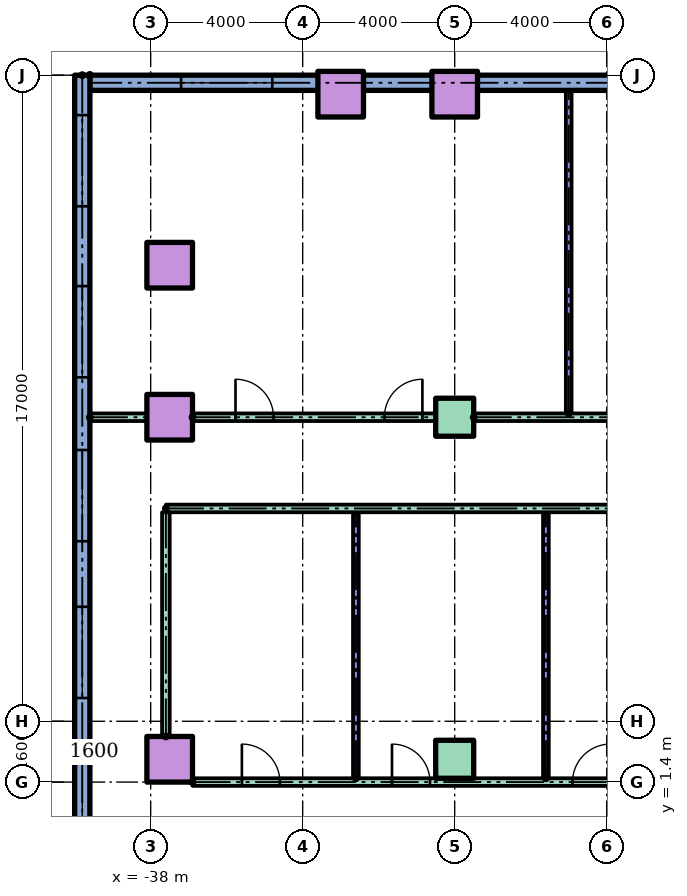
"""IFC4 building model, lengths in metres.
Left out: names, types, materials, properties, quantities, classifications, styles, units other than length and angle.
Written with IfcOpenShell. Run it as: python <this file> out.ifc"""

import sys

from ifc_helpers import new_model, si_unit, direction, frame, frame_2d, origin, origin_2d, place, context, subcontext, project, spatial, rectangle, hollow_rectangle, extrude, element, fill, save


model = new_model("IFC4")
c1 = context("Model", 3, precision=1e-05, world=origin(), true_north=direction((0.0, 1.0)))
c2 = subcontext(c1, "Body", "Model", "MODEL_VIEW")
j1 = project(units=[si_unit("LENGTHUNIT", "METRE"), si_unit("PLANEANGLEUNIT", "RADIAN")], contexts=[c1])
p1 = place(None, origin())
s1 = spatial("IfcSite", under=j1, at=p1, CompositionType="ELEMENT")
p2 = place(p1, origin())
s2 = spatial("IfcBuilding", under=s1, at=p2, CompositionType="ELEMENT")
p3 = place(p2, frame((0.0, 0.0, 10.0)))
s3 = spatial("IfcBuildingStorey", under=s2, at=p3, CompositionType="ELEMENT", Elevation=10.0)
p4 = place(p3, frame((-37.5, 2.0, 0.0)))
e1 = element("IfcColumn", 1, at=p4, inside=s3, PredefinedType="COLUMN", context=c2, shape_type="SweptSolid", body=[
    extrude(hollow_rectangle(XDim=1.2, YDim=1.2, WallThickness=0.06, at=origin_2d()), origin(), (0.0, 0.0, 1.0), 4.0),
])
p5 = place(p3, frame((-30.0, 2.0, 0.0)))
e2 = element("IfcColumn", 2, at=p5, inside=s3, PredefinedType="COLUMN", context=c2, shape_type="SweptSolid", body=[
    extrude(rectangle(XDim=1.0, YDim=1.0, at=origin_2d()), origin(), (0.0, 0.0, 1.0), 4.0),
])
p6 = place(p3, frame((-37.5, 11.0, 0.0)))
e3 = element("IfcColumn", 3, at=p6, inside=s3, PredefinedType="COLUMN", context=c2, shape_type="SweptSolid", body=[
    extrude(hollow_rectangle(XDim=1.2, YDim=1.2, WallThickness=0.06, at=origin_2d()), origin(), (0.0, 0.0, 1.0), 4.0),
])
p7 = place(p3, frame((-30.0, 11.0, 0.0)))
e4 = element("IfcColumn", 4, at=p7, inside=s3, PredefinedType="COLUMN", context=c2, shape_type="SweptSolid", body=[
    extrude(rectangle(XDim=1.0, YDim=1.0, at=origin_2d()), origin(), (0.0, 0.0, 1.0), 4.0),
])
for number, where in (
    (5, (-37.5, 15.0, 0.0)),
    (6, (-33.0, 19.5, 0.0)),
    (7, (-30.0, 19.5, 0.0)),
):
    element("IfcColumn", number, at=place(p3, frame(where)), inside=s3, PredefinedType="COLUMN", context=c2, shape_type="SweptSolid", body=[
        extrude(hollow_rectangle(XDim=1.2, YDim=1.2, WallThickness=0.06, at=origin_2d()), origin(), (0.0, 0.0, 1.0), 4.0),
    ])
p8 = place(p3, frame((-14.0, 19.8, 0.0), z_axis=(0.0, 0.0, 1.0), x_axis=(-1.0, 0.0, 0.0)))
e8 = element("IfcWall", 8, at=p8, inside=s3, PredefinedType="STANDARD", context=c2, shape_type="SweptSolid", body=[
    extrude(rectangle(XDim=25.6, YDim=0.4, at=frame_2d((12.8, 0.0))), origin(), (0.0, 0.0, 1.0), 3.7),
])
p9 = place(p8, frame((0.8, 0.0, 0.9)))
e9 = element("IfcOpeningElement", 9, at=p9, cuts=e8, PredefinedType="OPENING", context=c2, shape_type="SweptSolid", body=[
    extrude(rectangle(XDim=2.4, YDim=2.1, at=frame_2d((1.2, 1.05))), frame((0.0, 0.21, 0.0), z_axis=(0.0, -1.0, 0.0), x_axis=(1.0, 0.0, 0.0)), (0.0, 0.0, 1.0), 0.42),
])
p10 = place(p8, frame((4.535, 0.0, 0.9)))
e10 = element("IfcOpeningElement", 10, at=p10, cuts=e8, PredefinedType="OPENING", context=c2, shape_type="SweptSolid", body=[
    extrude(rectangle(XDim=2.4, YDim=2.1, at=frame_2d((1.2, 1.05))), frame((0.0, 0.21, 0.0), z_axis=(0.0, -1.0, 0.0), x_axis=(1.0, 0.0, 0.0)), (0.0, 0.0, 1.0), 0.42),
])
p11 = place(p8, frame((9.065, 0.0, 0.9)))
e11 = element("IfcOpeningElement", 11, at=p11, cuts=e8, PredefinedType="OPENING", context=c2, shape_type="SweptSolid", body=[
    extrude(rectangle(XDim=2.4, YDim=2.1, at=frame_2d((1.2, 1.05))), frame((0.0, 0.21, 0.0), z_axis=(0.0, -1.0, 0.0), x_axis=(1.0, 0.0, 0.0)), (0.0, 0.0, 1.0), 0.42),
])
p12 = place(p8, frame((20.8, 0.0, 0.9)))
e12 = element("IfcOpeningElement", 12, at=p12, cuts=e8, PredefinedType="OPENING", context=c2, shape_type="SweptSolid", body=[
    extrude(rectangle(XDim=2.4, YDim=2.1, at=frame_2d((1.2, 1.05))), frame((0.0, 0.21, 0.0), z_axis=(0.0, -1.0, 0.0), x_axis=(1.0, 0.0, 0.0)), (0.0, 0.0, 1.0), 0.42),
])
p13 = place(p3, frame((-39.8, 20.0, 0.0), z_axis=(0.0, 0.0, 1.0), x_axis=(0.0, -1.0, 0.0)))
e13 = element("IfcWall", 13, at=p13, inside=s3, PredefinedType="STANDARD", context=c2, shape_type="SweptSolid", body=[
    extrude(rectangle(XDim=70.0, YDim=0.4, at=frame_2d((35.0, 0.0))), origin(), (0.0, 0.0, 1.0), 3.7),
])
p14 = place(p13, frame((1.05, 0.0, 0.9)))
e14 = element("IfcOpeningElement", 14, at=p14, cuts=e13, PredefinedType="OPENING", context=c2, shape_type="SweptSolid", body=[
    extrude(rectangle(XDim=2.4, YDim=2.1, at=frame_2d((1.2, 1.05))), frame((0.0, 0.21, 0.0), z_axis=(0.0, -1.0, 0.0), x_axis=(1.0, 0.0, 0.0)), (0.0, 0.0, 1.0), 0.42),
])
p15 = place(p13, frame((5.55, 0.0, 0.9)))
e15 = element("IfcOpeningElement", 15, at=p15, cuts=e13, PredefinedType="OPENING", context=c2, shape_type="SweptSolid", body=[
    extrude(rectangle(XDim=2.4, YDim=2.1, at=frame_2d((1.2, 1.05))), frame((0.0, 0.21, 0.0), z_axis=(0.0, -1.0, 0.0), x_axis=(1.0, 0.0, 0.0)), (0.0, 0.0, 1.0), 0.42),
])
p16 = place(p13, frame((9.863, 0.0, 0.9)))
e16 = element("IfcOpeningElement", 16, at=p16, cuts=e13, PredefinedType="OPENING", context=c2, shape_type="SweptSolid", body=[
    extrude(rectangle(XDim=2.4, YDim=2.1, at=frame_2d((1.2, 1.05))), frame((0.0, 0.21, 0.0), z_axis=(0.0, -1.0, 0.0), x_axis=(1.0, 0.0, 0.0)), (0.0, 0.0, 1.0), 0.42),
])
p17 = place(p13, frame((13.988, 0.0, 0.9)))
e17 = element("IfcOpeningElement", 17, at=p17, cuts=e13, PredefinedType="OPENING", context=c2, shape_type="SweptSolid", body=[
    extrude(rectangle(XDim=2.4, YDim=2.1, at=frame_2d((1.2, 1.05))), frame((0.0, 0.21, 0.0), z_axis=(0.0, -1.0, 0.0), x_axis=(1.0, 0.0, 0.0)), (0.0, 0.0, 1.0), 0.42),
])
p18 = place(p13, frame((18.113, 0.0, 0.9)))
e18 = element("IfcOpeningElement", 18, at=p18, cuts=e13, PredefinedType="OPENING", context=c2, shape_type="SweptSolid", body=[
    extrude(rectangle(XDim=2.4, YDim=2.1, at=frame_2d((1.2, 1.05))), frame((0.0, 0.21, 0.0), z_axis=(0.0, -1.0, 0.0), x_axis=(1.0, 0.0, 0.0)), (0.0, 0.0, 1.0), 0.42),
])
p19 = place(p13, frame((22.238, 0.0, 0.9)))
e19 = element("IfcOpeningElement", 19, at=p19, cuts=e13, PredefinedType="OPENING", context=c2, shape_type="SweptSolid", body=[
    extrude(rectangle(XDim=2.4, YDim=2.1, at=frame_2d((1.2, 1.05))), frame((0.0, 0.21, 0.0), z_axis=(0.0, -1.0, 0.0), x_axis=(1.0, 0.0, 0.0)), (0.0, 0.0, 1.0), 0.42),
])
p20 = place(p13, frame((26.363, 0.0, 0.9)))
e20 = element("IfcOpeningElement", 20, at=p20, cuts=e13, PredefinedType="OPENING", context=c2, shape_type="SweptSolid", body=[
    extrude(rectangle(XDim=2.4, YDim=2.1, at=frame_2d((1.2, 1.05))), frame((0.0, 0.21, 0.0), z_axis=(0.0, -1.0, 0.0), x_axis=(1.0, 0.0, 0.0)), (0.0, 0.0, 1.0), 0.42),
])
p21 = place(p13, frame((30.488, 0.0, 0.9)))
e21 = element("IfcOpeningElement", 21, at=p21, cuts=e13, PredefinedType="OPENING", context=c2, shape_type="SweptSolid", body=[
    extrude(rectangle(XDim=2.4, YDim=2.1, at=frame_2d((1.2, 1.05))), frame((0.0, 0.21, 0.0), z_axis=(0.0, -1.0, 0.0), x_axis=(1.0, 0.0, 0.0)), (0.0, 0.0, 1.0), 0.42),
])
p22 = place(p13, frame((34.613, 0.0, 0.9)))
e22 = element("IfcOpeningElement", 22, at=p22, cuts=e13, PredefinedType="OPENING", context=c2, shape_type="SweptSolid", body=[
    extrude(rectangle(XDim=2.4, YDim=2.1, at=frame_2d((1.2, 1.05))), frame((0.0, 0.21, 0.0), z_axis=(0.0, -1.0, 0.0), x_axis=(1.0, 0.0, 0.0)), (0.0, 0.0, 1.0), 0.42),
])
p23 = place(p13, frame((38.738, 0.0, 0.9)))
e23 = element("IfcOpeningElement", 23, at=p23, cuts=e13, PredefinedType="OPENING", context=c2, shape_type="SweptSolid", body=[
    extrude(rectangle(XDim=2.4, YDim=2.1, at=frame_2d((1.2, 1.05))), frame((0.0, 0.21, 0.0), z_axis=(0.0, -1.0, 0.0), x_axis=(1.0, 0.0, 0.0)), (0.0, 0.0, 1.0), 0.42),
])
p24 = place(p13, frame((42.633, 0.0, 0.9)))
e24 = element("IfcOpeningElement", 24, at=p24, cuts=e13, PredefinedType="OPENING", context=c2, shape_type="SweptSolid", body=[
    extrude(rectangle(XDim=2.4, YDim=2.1, at=frame_2d((1.2, 1.05))), frame((0.0, 0.21, 0.0), z_axis=(0.0, -1.0, 0.0), x_axis=(1.0, 0.0, 0.0)), (0.0, 0.0, 1.0), 0.42),
])
p25 = place(p13, frame((46.3, 0.0, 0.9)))
e25 = element("IfcOpeningElement", 25, at=p25, cuts=e13, PredefinedType="OPENING", context=c2, shape_type="SweptSolid", body=[
    extrude(rectangle(XDim=2.4, YDim=2.1, at=frame_2d((1.2, 1.05))), frame((0.0, 0.21, 0.0), z_axis=(0.0, -1.0, 0.0), x_axis=(1.0, 0.0, 0.0)), (0.0, 0.0, 1.0), 0.42),
])
p26 = place(p13, frame((49.967, 0.0, 0.9)))
e26 = element("IfcOpeningElement", 26, at=p26, cuts=e13, PredefinedType="OPENING", context=c2, shape_type="SweptSolid", body=[
    extrude(rectangle(XDim=2.4, YDim=2.1, at=frame_2d((1.2, 1.05))), frame((0.0, 0.21, 0.0), z_axis=(0.0, -1.0, 0.0), x_axis=(1.0, 0.0, 0.0)), (0.0, 0.0, 1.0), 0.42),
])
p27 = place(p13, frame((66.85, 0.0, 0.9)))
e27 = element("IfcOpeningElement", 27, at=p27, cuts=e13, PredefinedType="OPENING", context=c2, shape_type="SweptSolid", body=[
    extrude(rectangle(XDim=2.4, YDim=2.1, at=frame_2d((1.2, 1.05))), frame((0.0, 0.21, 0.0), z_axis=(0.0, -1.0, 0.0), x_axis=(1.0, 0.0, 0.0)), (0.0, 0.0, 1.0), 0.42),
])
p28 = place(p3, frame((-36.9, 1.4, 0.0)))
e28 = element("IfcWall", 28, at=p28, inside=s3, PredefinedType="PARTITIONING", context=c2, shape_type="SweptSolid", body=[
    extrude(rectangle(XDim=20.6, YDim=0.2, at=frame_2d((10.3, 0.0))), origin(), (0.0, 0.0, 1.0), 3.7),
])
p29 = place(p28, frame((1.3, 0.0, 0.0)))
e29 = element("IfcOpeningElement", 29, at=p29, cuts=e28, PredefinedType="OPENING", context=c2, shape_type="SweptSolid", body=[
    extrude(rectangle(XDim=1.0, YDim=2.1, at=frame_2d((0.5, 1.05))), frame((0.0, 0.11, 0.0), z_axis=(0.0, -1.0, 0.0), x_axis=(1.0, 0.0, 0.0)), (0.0, 0.0, 1.0), 0.22),
])
p30 = place(p28, frame((5.25, 0.0, 0.0)))
e30 = element("IfcOpeningElement", 30, at=p30, cuts=e28, PredefinedType="OPENING", context=c2, shape_type="SweptSolid", body=[
    extrude(rectangle(XDim=1.0, YDim=2.1, at=frame_2d((0.5, 1.05))), frame((0.0, 0.11, 0.0), z_axis=(0.0, -1.0, 0.0), x_axis=(1.0, 0.0, 0.0)), (0.0, 0.0, 1.0), 0.22),
])
p31 = place(p28, frame((10.0, 0.0, 0.0)))
e31 = element("IfcOpeningElement", 31, at=p31, cuts=e28, PredefinedType="OPENING", context=c2, shape_type="SweptSolid", body=[
    extrude(rectangle(XDim=1.0, YDim=2.1, at=frame_2d((0.5, 1.05))), frame((0.0, 0.11, 0.0), z_axis=(0.0, -1.0, 0.0), x_axis=(1.0, 0.0, 0.0)), (0.0, 0.0, 1.0), 0.22),
])
p32 = place(p28, frame((12.35, 0.0, 0.0)))
e32 = element("IfcOpeningElement", 32, at=p32, cuts=e28, PredefinedType="OPENING", context=c2, shape_type="SweptSolid", body=[
    extrude(rectangle(XDim=0.9, YDim=2.1, at=frame_2d((0.45, 1.05))), frame((0.0, 0.11, 0.0), z_axis=(0.0, -1.0, 0.0), x_axis=(1.0, 0.0, 0.0)), (0.0, 0.0, 1.0), 0.22),
])
p33 = place(p3, frame((-37.6, 8.6, 0.0)))
e33 = element("IfcWall", 33, at=p33, inside=s3, PredefinedType="PARTITIONING", context=c2, shape_type="SweptSolid", body=[
    extrude(rectangle(XDim=21.3, YDim=0.2, at=frame_2d((10.65, 0.0))), origin(), (0.0, 0.0, 1.0), 3.7),
])
p34 = place(p3, frame((-39.6, 11.0, 0.0)))
e34 = element("IfcWall", 34, at=p34, inside=s3, PredefinedType="PARTITIONING", context=c2, shape_type="SweptSolid", body=[
    extrude(rectangle(XDim=1.5, YDim=0.2, at=frame_2d((0.75, 0.0))), origin(), (0.0, 0.0, 1.0), 3.7),
])
p35 = place(p3, frame((-36.9, 11.0, 0.0)))
e35 = element("IfcWall", 35, at=p35, inside=s3, PredefinedType="PARTITIONING", context=c2, shape_type="SweptSolid", body=[
    extrude(rectangle(XDim=6.4, YDim=0.2, at=frame_2d((3.2, 0.0))), origin(), (0.0, 0.0, 1.0), 3.7),
])
p36 = place(p35, frame((1.132, 0.0, 0.0)))
e36 = element("IfcOpeningElement", 36, at=p36, cuts=e35, PredefinedType="OPENING", context=c2, shape_type="SweptSolid", body=[
    extrude(rectangle(XDim=1.0, YDim=2.1, at=frame_2d((0.5, 1.05))), frame((0.0, 0.11, 0.0), z_axis=(0.0, -1.0, 0.0), x_axis=(1.0, 0.0, 0.0)), (0.0, 0.0, 1.0), 0.22),
])
p37 = place(p35, frame((5.05, 0.0, 0.0)))
e37 = element("IfcOpeningElement", 37, at=p37, cuts=e35, PredefinedType="OPENING", context=c2, shape_type="SweptSolid", body=[
    extrude(rectangle(XDim=1.0, YDim=2.1, at=frame_2d((0.5, 1.05))), frame((0.0, 0.11, 0.0), z_axis=(0.0, -1.0, 0.0), x_axis=(1.0, 0.0, 0.0)), (0.0, 0.0, 1.0), 0.22),
])
p38 = place(p3, frame((-29.5, 11.0, 0.0)))
e38 = element("IfcWall", 38, at=p38, inside=s3, PredefinedType="PARTITIONING", context=c2, shape_type="SweptSolid", body=[
    extrude(rectangle(XDim=7.0, YDim=0.2, at=frame_2d((3.5, 0.0))), origin(), (0.0, 0.0, 1.0), 3.7),
])
p39 = place(p3, frame((-37.6, 2.6, 0.0), z_axis=(0.0, 0.0, 1.0), x_axis=(0.0, 1.0, 0.0)))
e39 = element("IfcWall", 39, at=p39, inside=s3, PredefinedType="PARTITIONING", context=c2, shape_type="SweptSolid", body=[
    extrude(rectangle(XDim=5.9, YDim=0.2, at=frame_2d((2.95, 0.0))), origin(), (0.0, 0.0, 1.0), 3.7),
])
for number, where, z_axis, x_axis in (
    (40, (-32.6, 1.5, 0.0), (0.0, 0.0, 1.0), (0.0, 1.0, 0.0)),
    (41, (-27.6, 1.5, 0.0), (0.0, 0.0, 1.0), (0.0, 1.0, 0.0)),
):
    element("IfcWall", number, at=place(p3, frame(where, z_axis=z_axis, x_axis=x_axis)), inside=s3, PredefinedType="PARTITIONING", context=c2, shape_type="SweptSolid", body=[
        extrude(rectangle(XDim=7.0, YDim=0.15, at=frame_2d((3.5, 0.0))), origin(), (0.0, 0.0, 1.0), 3.7),
    ])
p40 = place(p3, frame((-27.0, 11.1, 0.0), z_axis=(0.0, 0.0, 1.0), x_axis=(0.0, 1.0, 0.0)))
e42 = element("IfcWall", 42, at=p40, inside=s3, PredefinedType="PARTITIONING", context=c2, shape_type="SweptSolid", body=[
    extrude(rectangle(XDim=8.5, YDim=0.15, at=frame_2d((4.25, 0.0))), origin(), (0.0, 0.0, 1.0), 3.7),
])
p41 = place(p12, origin())
e43 = element("IfcWindow", 43, at=p41, inside=s3, PartitioningType="SINGLE_PANEL", PredefinedType="WINDOW", context=c2, shape_type="SweptSolid", body=[
    extrude(rectangle(XDim=2.4, YDim=2.1, at=frame_2d((1.2, 1.05))), frame((0.0, 0.03, 0.0), z_axis=(0.0, -1.0, 0.0), x_axis=(1.0, 0.0, 0.0)), (0.0, 0.0, 1.0), 0.06),
])
fill(e12, e43)
p42 = place(p14, origin())
e44 = element("IfcWindow", 44, at=p42, inside=s3, PartitioningType="SINGLE_PANEL", PredefinedType="WINDOW", context=c2, shape_type="SweptSolid", body=[
    extrude(rectangle(XDim=2.4, YDim=2.1, at=frame_2d((1.2, 1.05))), frame((0.0, 0.03, 0.0), z_axis=(0.0, -1.0, 0.0), x_axis=(1.0, 0.0, 0.0)), (0.0, 0.0, 1.0), 0.06),
])
fill(e14, e44)
p43 = place(p15, origin())
e45 = element("IfcWindow", 45, at=p43, inside=s3, PartitioningType="SINGLE_PANEL", PredefinedType="WINDOW", context=c2, shape_type="SweptSolid", body=[
    extrude(rectangle(XDim=2.4, YDim=2.1, at=frame_2d((1.2, 1.05))), frame((0.0, 0.03, 0.0), z_axis=(0.0, -1.0, 0.0), x_axis=(1.0, 0.0, 0.0)), (0.0, 0.0, 1.0), 0.06),
])
fill(e15, e45)
p44 = place(p16, origin())
e46 = element("IfcWindow", 46, at=p44, inside=s3, PartitioningType="SINGLE_PANEL", PredefinedType="WINDOW", context=c2, shape_type="SweptSolid", body=[
    extrude(rectangle(XDim=2.4, YDim=2.1, at=frame_2d((1.2, 1.05))), frame((0.0, 0.03, 0.0), z_axis=(0.0, -1.0, 0.0), x_axis=(1.0, 0.0, 0.0)), (0.0, 0.0, 1.0), 0.06),
])
fill(e16, e46)
p45 = place(p17, origin())
e47 = element("IfcWindow", 47, at=p45, inside=s3, PartitioningType="SINGLE_PANEL", PredefinedType="WINDOW", context=c2, shape_type="SweptSolid", body=[
    extrude(rectangle(XDim=2.4, YDim=2.1, at=frame_2d((1.2, 1.05))), frame((0.0, 0.03, 0.0), z_axis=(0.0, -1.0, 0.0), x_axis=(1.0, 0.0, 0.0)), (0.0, 0.0, 1.0), 0.06),
])
fill(e17, e47)
p46 = place(p18, origin())
e48 = element("IfcWindow", 48, at=p46, inside=s3, PartitioningType="SINGLE_PANEL", PredefinedType="WINDOW", context=c2, shape_type="SweptSolid", body=[
    extrude(rectangle(XDim=2.4, YDim=2.1, at=frame_2d((1.2, 1.05))), frame((0.0, 0.03, 0.0), z_axis=(0.0, -1.0, 0.0), x_axis=(1.0, 0.0, 0.0)), (0.0, 0.0, 1.0), 0.06),
])
fill(e18, e48)
p47 = place(p29, origin())
e49 = element("IfcDoor", 49, at=p47, inside=s3, OperationType="SINGLE_SWING_LEFT", PredefinedType="DOOR", context=c2, shape_type="SweptSolid", body=[
    extrude(rectangle(XDim=1.0, YDim=2.1, at=frame_2d((0.5, 1.05))), frame((0.0, 0.025, 0.0), z_axis=(0.0, -1.0, 0.0), x_axis=(1.0, 0.0, 0.0)), (0.0, 0.0, 1.0), 0.05),
])
fill(e29, e49)
p48 = place(p30, origin())
e50 = element("IfcDoor", 50, at=p48, inside=s3, OperationType="SINGLE_SWING_LEFT", PredefinedType="DOOR", context=c2, shape_type="SweptSolid", body=[
    extrude(rectangle(XDim=1.0, YDim=2.1, at=frame_2d((0.5, 1.05))), frame((0.0, 0.025, 0.0), z_axis=(0.0, -1.0, 0.0), x_axis=(1.0, 0.0, 0.0)), (0.0, 0.0, 1.0), 0.05),
])
fill(e30, e50)
p49 = place(p31, origin())
e51 = element("IfcDoor", 51, at=p49, inside=s3, OperationType="SINGLE_SWING_RIGHT", PredefinedType="DOOR", context=c2, shape_type="SweptSolid", body=[
    extrude(rectangle(XDim=1.0, YDim=2.1, at=frame_2d((0.5, 1.05))), frame((0.0, 0.025, 0.0), z_axis=(0.0, -1.0, 0.0), x_axis=(1.0, 0.0, 0.0)), (0.0, 0.0, 1.0), 0.05),
])
fill(e31, e51)
p50 = place(p36, origin())
e52 = element("IfcDoor", 52, at=p50, inside=s3, OperationType="SINGLE_SWING_LEFT", PredefinedType="DOOR", context=c2, shape_type="SweptSolid", body=[
    extrude(rectangle(XDim=1.0, YDim=2.1, at=frame_2d((0.5, 1.05))), frame((0.0, 0.025, 0.0), z_axis=(0.0, -1.0, 0.0), x_axis=(1.0, 0.0, 0.0)), (0.0, 0.0, 1.0), 0.05),
])
fill(e36, e52)
p51 = place(p37, origin())
e53 = element("IfcDoor", 53, at=p51, inside=s3, OperationType="SINGLE_SWING_RIGHT", PredefinedType="DOOR", context=c2, shape_type="SweptSolid", body=[
    extrude(rectangle(XDim=1.0, YDim=2.1, at=frame_2d((0.5, 1.05))), frame((0.0, 0.025, 0.0), z_axis=(0.0, -1.0, 0.0), x_axis=(1.0, 0.0, 0.0)), (0.0, 0.0, 1.0), 0.05),
])
fill(e37, e53)
save(model, sys.argv[1])
